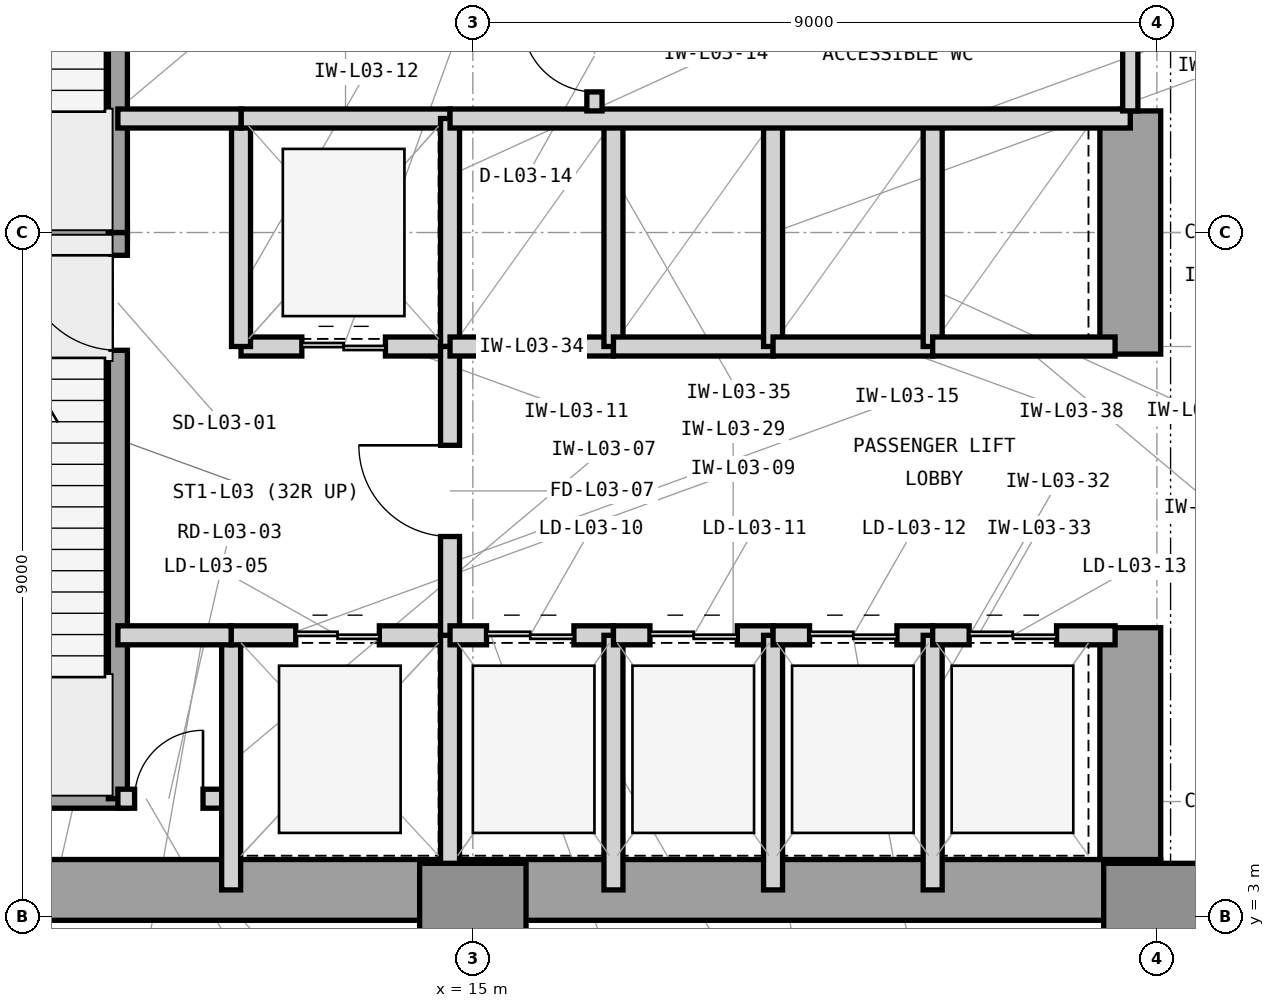
"""IFC4 building model, lengths in metres.
Left out: names, types, materials, properties, quantities, classifications, styles, units other than length and angle.
Written with IfcOpenShell. Run it as: python <this file> out.ifc"""

import sys

from ifc_helpers import new_model, si_unit, direction, frame, frame_2d, origin, origin_2d, place, context, subcontext, project, spatial, rectangle, extrude, element, fill, save


model = new_model("IFC4")
c1 = context("Model", 3, precision=1e-05, world=origin(), true_north=direction((0.0, 1.0)))
c2 = subcontext(c1, "Body", "Model", "MODEL_VIEW")
j1 = project(units=[si_unit("LENGTHUNIT", "METRE"), si_unit("PLANEANGLEUNIT", "RADIAN")], contexts=[c1])
p1 = place(None, origin())
s1 = spatial("IfcSite", under=j1, at=p1, CompositionType="ELEMENT")
p2 = place(p1, origin())
s2 = spatial("IfcBuilding", under=s1, at=p2, CompositionType="ELEMENT")
p3 = place(p2, frame((0.0, 0.0, 16.2)))
s3 = spatial("IfcBuildingStorey", under=s2, at=p3, CompositionType="ELEMENT", Elevation=16.2)
p4 = place(p3, frame((7.475, 3.35, 0.0), z_axis=(0.0, 0.0, 1.0), x_axis=(1.0, 0.0, 0.0)))
e1 = element("IfcWall", 1, at=p4, inside=s3, PredefinedType="SHEAR", context=c2, shape_type="SweptSolid", body=[
    extrude(rectangle(XDim=16.575, YDim=0.8, at=frame_2d((8.288, 0.0))), origin(), (0.0, 0.0, 1.0), 5.4),
])
p5 = place(p3, frame((23.65, 3.75, 0.0), z_axis=(0.0, 0.0, 1.0), x_axis=(0.0, 1.0, 0.0)))
e2 = element("IfcWall", 2, at=p5, inside=s3, PredefinedType="SHEAR", context=c2, shape_type="SweptSolid", body=[
    extrude(rectangle(XDim=3.05, YDim=0.8, at=frame_2d((1.525, 0.0))), origin(), (0.0, 0.0, 1.0), 5.4),
])
p6 = place(p3, frame((23.65, 10.4, 0.0), z_axis=(0.0, 0.0, 1.0), x_axis=(0.0, 1.0, 0.0)))
e3 = element("IfcWall", 3, at=p6, inside=s3, PredefinedType="SHEAR", context=c2, shape_type="SweptSolid", body=[
    extrude(rectangle(XDim=3.2, YDim=0.8, at=frame_2d((1.6, 0.0))), origin(), (0.0, 0.0, 1.0), 5.4),
])
for number, where, z_axis, x_axis in (
    (4, (15.0, 3.0, -0.6), (0.0, 0.0, 1.0), (1.0, 0.0, 0.0)),
    (5, (24.0, 3.0, -0.6), (0.0, 0.0, 1.0), (1.0, 0.0, 0.0)),
):
    element("IfcColumn", number, at=place(p3, frame(where, z_axis=z_axis, x_axis=x_axis)), inside=s3, PredefinedType="COLUMN", context=c2, shape_type="SweptSolid", body=[
        extrude(rectangle(XDim=1.4, YDim=1.4, at=origin_2d()), origin(), (0.0, 0.0, 1.0), 6.0),
    ])
p7 = place(p3, frame((6.35, 12.0, 0.0), z_axis=(0.0, 0.0, 1.0), x_axis=(1.0, 0.0, 0.0)))
e6 = element("IfcWall", 6, at=p7, inside=s3, PredefinedType="SHEAR", context=c2, shape_type="SweptSolid", body=[
    extrude(rectangle(XDim=4.105, YDim=0.25, at=frame_2d((2.052, 0.0))), origin(), (0.0, 0.0, 1.0), 5.4),
])
p8 = place(p3, frame((7.7, 4.55, 0.0), z_axis=(0.0, 0.0, 1.0), x_axis=(1.0, 0.0, 0.0)))
e7 = element("IfcWall", 7, at=p8, inside=s3, PredefinedType="SHEAR", context=c2, shape_type="SweptSolid", body=[
    extrude(rectangle(XDim=2.755, YDim=0.25, at=frame_2d((1.377, 0.0))), origin(), (0.0, 0.0, 1.0), 5.4),
])
p9 = place(p3, frame((10.33, 4.55, 0.0), z_axis=(0.0, 0.0, 1.0), x_axis=(0.0, 1.0, 0.0)))
e8 = element("IfcWall", 8, at=p9, inside=s3, PredefinedType="SHEAR", context=c2, shape_type="SweptSolid", body=[
    extrude(rectangle(XDim=7.45, YDim=0.25, at=frame_2d((3.725, 0.0))), origin(), (0.0, 0.0, 1.0), 5.4),
])
p10 = place(p9, frame((5.9, 0.0, 0.0)))
e9 = element("IfcOpeningElement", 9, at=p10, cuts=e8, PredefinedType="OPENING", context=c2, shape_type="SweptSolid", body=[
    extrude(rectangle(XDim=1.25, YDim=2.2, at=frame_2d((0.625, 1.1))), frame((0.0, 0.135, 0.0), z_axis=(0.0, -1.0, 0.0), x_axis=(1.0, 0.0, 0.0)), (0.0, 0.0, 1.0), 0.27),
])
p11 = place(p3, frame((10.33, 12.0, 0.0), z_axis=(0.0, 0.0, 1.0), x_axis=(0.0, 1.0, 0.0)))
e10 = element("IfcWall", 10, at=p11, inside=s3, PredefinedType="SHEAR", context=c2, shape_type="SweptSolid", body=[
    extrude(rectangle(XDim=7.45, YDim=0.25, at=frame_2d((3.725, 0.0))), origin(), (0.0, 0.0, 1.0), 5.4),
])
p12 = place(p11, frame((5.85, 0.0, 0.0)))
e11 = element("IfcOpeningElement", 11, at=p12, cuts=e10, PredefinedType="OPENING", context=c2, shape_type="SweptSolid", body=[
    extrude(rectangle(XDim=1.25, YDim=2.2, at=frame_2d((0.625, 1.1))), frame((0.0, 0.135, 0.0), z_axis=(0.0, -1.0, 0.0), x_axis=(1.0, 0.0, 0.0)), (0.0, 0.0, 1.0), 0.27),
])
p13 = place(p3, frame((10.33, 4.55, 0.0), z_axis=(0.0, 0.0, 1.0), x_axis=(1.0, 0.0, 0.0)))
e12 = element("IfcWall", 12, at=p13, inside=s3, PredefinedType="PARTITIONING", context=c2, shape_type="SweptSolid", body=[
    extrude(rectangle(XDim=1.49, YDim=0.25, at=frame_2d((0.745, 0.0))), origin(), (0.0, 0.0, 1.0), 5.13),
])
p14 = place(p13, frame((0.22, 0.0, 0.0)))
e13 = element("IfcOpeningElement", 13, at=p14, cuts=e12, PredefinedType="OPENING", context=c2, shape_type="SweptSolid", body=[
    extrude(rectangle(XDim=0.9, YDim=2.1, at=frame_2d((0.45, 1.05))), frame((0.0, 0.135, 0.0), z_axis=(0.0, -1.0, 0.0), x_axis=(1.0, 0.0, 0.0)), (0.0, 0.0, 1.0), 0.27),
])
p15 = place(p3, frame((11.82, 3.35, 0.0), z_axis=(0.0, 0.0, 1.0), x_axis=(0.0, 1.0, 0.0)))
e14 = element("IfcWall", 14, at=p15, inside=s3, PredefinedType="PARTITIONING", context=c2, shape_type="SweptSolid", body=[
    extrude(rectangle(XDim=3.35, YDim=0.25, at=frame_2d((1.675, 0.0))), origin(), (0.0, 0.0, 1.0), 5.13),
])
p16 = place(p3, frame((11.82, 6.7, 0.0), z_axis=(0.0, 0.0, 1.0), x_axis=(1.0, 0.0, 0.0)))
e15 = element("IfcWall", 15, at=p16, inside=s3, PredefinedType="PARTITIONING", context=c2, shape_type="SweptSolid", body=[
    extrude(rectangle(XDim=2.88, YDim=0.25, at=frame_2d((1.44, 0.0))), origin(), (0.0, 0.0, 1.0), 4.626),
])
p17 = place(p16, frame((0.85, 0.0, 0.0)))
e16 = element("IfcOpeningElement", 16, at=p17, cuts=e15, PredefinedType="OPENING", context=c2, shape_type="SweptSolid", body=[
    extrude(rectangle(XDim=1.1, YDim=2.25, at=frame_2d((0.55, 1.125))), frame((0.0, 0.135, 0.0), z_axis=(0.0, -1.0, 0.0), x_axis=(1.0, 0.0, 0.0)), (0.0, 0.0, 1.0), 0.27),
])
p18 = place(p3, frame((14.7, 3.35, 0.0), z_axis=(0.0, 0.0, 1.0), x_axis=(0.0, 1.0, 0.0)))
e17 = element("IfcWall", 17, at=p18, inside=s3, PredefinedType="PARTITIONING", context=c2, shape_type="SweptSolid", body=[
    extrude(rectangle(XDim=3.35, YDim=0.25, at=frame_2d((1.675, 0.0))), origin(), (0.0, 0.0, 1.0), 5.13),
])
p19 = place(p3, frame((11.95, 10.5, 0.0), z_axis=(0.0, 0.0, 1.0), x_axis=(1.0, 0.0, 0.0)))
e18 = element("IfcWall", 18, at=p19, inside=s3, PredefinedType="PARTITIONING", context=c2, shape_type="SweptSolid", body=[
    extrude(rectangle(XDim=2.75, YDim=0.25, at=frame_2d((1.375, 0.0))), origin(), (0.0, 0.0, 1.0), 4.626),
])
p20 = place(p19, frame((0.8, 0.0, 0.0)))
e19 = element("IfcOpeningElement", 19, at=p20, cuts=e18, PredefinedType="OPENING", context=c2, shape_type="SweptSolid", body=[
    extrude(rectangle(XDim=1.1, YDim=2.25, at=frame_2d((0.55, 1.125))), frame((0.0, 0.135, 0.0), z_axis=(0.0, -1.0, 0.0), x_axis=(1.0, 0.0, 0.0)), (0.0, 0.0, 1.0), 0.27),
])
p21 = place(p3, frame((11.95, 10.5, 0.0), z_axis=(0.0, 0.0, 1.0), x_axis=(0.0, 1.0, 0.0)))
e20 = element("IfcWall", 20, at=p21, inside=s3, PredefinedType="PARTITIONING", context=c2, shape_type="SweptSolid", body=[
    extrude(rectangle(XDim=3.0, YDim=0.25, at=frame_2d((1.5, 0.0))), origin(), (0.0, 0.0, 1.0), 5.13),
])
p22 = place(p3, frame((11.95, 13.5, 0.0), z_axis=(0.0, 0.0, 1.0), x_axis=(1.0, 0.0, 0.0)))
e21 = element("IfcWall", 21, at=p22, inside=s3, PredefinedType="PARTITIONING", context=c2, shape_type="SweptSolid", body=[
    extrude(rectangle(XDim=2.75, YDim=0.25, at=frame_2d((1.375, 0.0))), origin(), (0.0, 0.0, 1.0), 4.626),
])
p23 = place(p3, frame((14.7, 10.5, 0.0), z_axis=(0.0, 0.0, 1.0), x_axis=(0.0, 1.0, 0.0)))
e22 = element("IfcWall", 22, at=p23, inside=s3, PredefinedType="PARTITIONING", context=c2, shape_type="SweptSolid", body=[
    extrude(rectangle(XDim=3.0, YDim=0.25, at=frame_2d((1.5, 0.0))), origin(), (0.0, 0.0, 1.0), 5.13),
])
p24 = place(p3, frame((14.7, 6.7, 0.0), z_axis=(0.0, 0.0, 1.0), x_axis=(0.0, 1.0, 0.0)))
e23 = element("IfcWall", 23, at=p24, inside=s3, PredefinedType="PARTITIONING", context=c2, shape_type="SweptSolid", body=[
    extrude(rectangle(XDim=3.8, YDim=0.25, at=frame_2d((1.9, 0.0))), origin(), (0.0, 0.0, 1.0), 5.13),
])
p25 = place(p24, frame((1.3, 0.0, 0.0)))
e24 = element("IfcOpeningElement", 24, at=p25, cuts=e23, PredefinedType="OPENING", context=c2, shape_type="SweptSolid", body=[
    extrude(rectangle(XDim=1.2, YDim=2.2, at=frame_2d((0.6, 1.1))), frame((0.0, 0.135, 0.0), z_axis=(0.0, -1.0, 0.0), x_axis=(1.0, 0.0, 0.0)), (0.0, 0.0, 1.0), 0.27),
])
p26 = place(p3, frame((10.33, 13.5, 0.0), z_axis=(0.0, 0.0, 1.0), x_axis=(1.0, 0.0, 0.0)))
e25 = element("IfcWall", 25, at=p26, inside=s3, PredefinedType="PARTITIONING", context=c2, shape_type="SweptSolid", body=[
    extrude(rectangle(XDim=1.62, YDim=0.25, at=frame_2d((0.81, 0.0))), origin(), (0.0, 0.0, 1.0), 4.626),
])
p27 = place(p3, frame((10.33, 6.7, 0.0), z_axis=(0.0, 0.0, 1.0), x_axis=(1.0, 0.0, 0.0)))
e26 = element("IfcWall", 26, at=p27, inside=s3, PredefinedType="PARTITIONING", context=c2, shape_type="SweptSolid", body=[
    extrude(rectangle(XDim=1.49, YDim=0.25, at=frame_2d((0.745, 0.0))), origin(), (0.0, 0.0, 1.0), 4.626),
])
p28 = place(p3, frame((14.7, 6.7, 0.0), z_axis=(0.0, 0.0, 1.0), x_axis=(1.0, 0.0, 0.0)))
e27 = element("IfcWall", 27, at=p28, inside=s3, PredefinedType="PARTITIONING", context=c2, shape_type="SweptSolid", body=[
    extrude(rectangle(XDim=2.15, YDim=0.25, at=frame_2d((1.075, 0.0))), origin(), (0.0, 0.0, 1.0), 4.626),
])
p29 = place(p28, frame((0.48, 0.0, 0.0)))
e28 = element("IfcOpeningElement", 28, at=p29, cuts=e27, PredefinedType="OPENING", context=c2, shape_type="SweptSolid", body=[
    extrude(rectangle(XDim=1.15, YDim=2.25, at=frame_2d((0.575, 1.125))), frame((0.0, 0.135, 0.0), z_axis=(0.0, -1.0, 0.0), x_axis=(1.0, 0.0, 0.0)), (0.0, 0.0, 1.0), 0.27),
])
p30 = place(p3, frame((16.85, 3.35, 0.0), z_axis=(0.0, 0.0, 1.0), x_axis=(0.0, 1.0, 0.0)))
e29 = element("IfcWall", 29, at=p30, inside=s3, PredefinedType="PARTITIONING", context=c2, shape_type="SweptSolid", body=[
    extrude(rectangle(XDim=3.35, YDim=0.25, at=frame_2d((1.675, 0.0))), origin(), (0.0, 0.0, 1.0), 5.13),
])
p31 = place(p3, frame((16.85, 6.7, 0.0), z_axis=(0.0, 0.0, 1.0), x_axis=(1.0, 0.0, 0.0)))
e30 = element("IfcWall", 30, at=p31, inside=s3, PredefinedType="PARTITIONING", context=c2, shape_type="SweptSolid", body=[
    extrude(rectangle(XDim=2.1, YDim=0.25, at=frame_2d((1.05, 0.0))), origin(), (0.0, 0.0, 1.0), 4.626),
])
p32 = place(p31, frame((0.48, 0.0, 0.0)))
e31 = element("IfcOpeningElement", 31, at=p32, cuts=e30, PredefinedType="OPENING", context=c2, shape_type="SweptSolid", body=[
    extrude(rectangle(XDim=1.15, YDim=2.25, at=frame_2d((0.575, 1.125))), frame((0.0, 0.135, 0.0), z_axis=(0.0, -1.0, 0.0), x_axis=(1.0, 0.0, 0.0)), (0.0, 0.0, 1.0), 0.27),
])
p33 = place(p3, frame((18.95, 3.35, 0.0), z_axis=(0.0, 0.0, 1.0), x_axis=(0.0, 1.0, 0.0)))
e32 = element("IfcWall", 32, at=p33, inside=s3, PredefinedType="PARTITIONING", context=c2, shape_type="SweptSolid", body=[
    extrude(rectangle(XDim=3.35, YDim=0.25, at=frame_2d((1.675, 0.0))), origin(), (0.0, 0.0, 1.0), 5.13),
])
p34 = place(p3, frame((18.95, 6.7, 0.0), z_axis=(0.0, 0.0, 1.0), x_axis=(1.0, 0.0, 0.0)))
e33 = element("IfcWall", 33, at=p34, inside=s3, PredefinedType="PARTITIONING", context=c2, shape_type="SweptSolid", body=[
    extrude(rectangle(XDim=2.1, YDim=0.25, at=frame_2d((1.05, 0.0))), origin(), (0.0, 0.0, 1.0), 4.626),
])
p35 = place(p34, frame((0.48, 0.0, 0.0)))
e34 = element("IfcOpeningElement", 34, at=p35, cuts=e33, PredefinedType="OPENING", context=c2, shape_type="SweptSolid", body=[
    extrude(rectangle(XDim=1.15, YDim=2.25, at=frame_2d((0.575, 1.125))), frame((0.0, 0.135, 0.0), z_axis=(0.0, -1.0, 0.0), x_axis=(1.0, 0.0, 0.0)), (0.0, 0.0, 1.0), 0.27),
])
p36 = place(p3, frame((21.05, 3.35, 0.0), z_axis=(0.0, 0.0, 1.0), x_axis=(0.0, 1.0, 0.0)))
e35 = element("IfcWall", 35, at=p36, inside=s3, PredefinedType="PARTITIONING", context=c2, shape_type="SweptSolid", body=[
    extrude(rectangle(XDim=3.35, YDim=0.25, at=frame_2d((1.675, 0.0))), origin(), (0.0, 0.0, 1.0), 5.13),
])
p37 = place(p3, frame((21.05, 6.7, 0.0), z_axis=(0.0, 0.0, 1.0), x_axis=(1.0, 0.0, 0.0)))
e36 = element("IfcWall", 36, at=p37, inside=s3, PredefinedType="PARTITIONING", context=c2, shape_type="SweptSolid", body=[
    extrude(rectangle(XDim=2.4, YDim=0.25, at=frame_2d((1.2, 0.0))), origin(), (0.0, 0.0, 1.0), 4.626),
])
p38 = place(p37, frame((0.48, 0.0, 0.0)))
e37 = element("IfcOpeningElement", 37, at=p38, cuts=e36, PredefinedType="OPENING", context=c2, shape_type="SweptSolid", body=[
    extrude(rectangle(XDim=1.15, YDim=2.25, at=frame_2d((0.575, 1.125))), frame((0.0, 0.135, 0.0), z_axis=(0.0, -1.0, 0.0), x_axis=(1.0, 0.0, 0.0)), (0.0, 0.0, 1.0), 0.27),
])
p39 = place(p3, frame((14.7, 10.5, 0.0), z_axis=(0.0, 0.0, 1.0), x_axis=(1.0, 0.0, 0.0)))
e38 = element("IfcWall", 38, at=p39, inside=s3, PredefinedType="PARTITIONING", context=c2, shape_type="SweptSolid", body=[
    extrude(rectangle(XDim=2.15, YDim=0.25, at=frame_2d((1.075, 0.0))), origin(), (0.0, 0.0, 1.0), 4.626),
])
p40 = place(p3, frame((16.85, 10.5, 0.0), z_axis=(0.0, 0.0, 1.0), x_axis=(0.0, 1.0, 0.0)))
e39 = element("IfcWall", 39, at=p40, inside=s3, PredefinedType="PARTITIONING", context=c2, shape_type="SweptSolid", body=[
    extrude(rectangle(XDim=3.0, YDim=0.25, at=frame_2d((1.5, 0.0))), origin(), (0.0, 0.0, 1.0), 5.13),
])
p41 = place(p3, frame((16.85, 10.5, 0.0), z_axis=(0.0, 0.0, 1.0), x_axis=(1.0, 0.0, 0.0)))
e40 = element("IfcWall", 40, at=p41, inside=s3, PredefinedType="PARTITIONING", context=c2, shape_type="SweptSolid", body=[
    extrude(rectangle(XDim=2.1, YDim=0.25, at=frame_2d((1.05, 0.0))), origin(), (0.0, 0.0, 1.0), 4.626),
])
p42 = place(p3, frame((18.95, 10.5, 0.0), z_axis=(0.0, 0.0, 1.0), x_axis=(0.0, 1.0, 0.0)))
e41 = element("IfcWall", 41, at=p42, inside=s3, PredefinedType="PARTITIONING", context=c2, shape_type="SweptSolid", body=[
    extrude(rectangle(XDim=3.0, YDim=0.25, at=frame_2d((1.5, 0.0))), origin(), (0.0, 0.0, 1.0), 5.13),
])
p43 = place(p3, frame((18.95, 10.5, 0.0), z_axis=(0.0, 0.0, 1.0), x_axis=(1.0, 0.0, 0.0)))
e42 = element("IfcWall", 42, at=p43, inside=s3, PredefinedType="PARTITIONING", context=c2, shape_type="SweptSolid", body=[
    extrude(rectangle(XDim=2.1, YDim=0.25, at=frame_2d((1.05, 0.0))), origin(), (0.0, 0.0, 1.0), 4.626),
])
p44 = place(p3, frame((21.05, 10.5, 0.0), z_axis=(0.0, 0.0, 1.0), x_axis=(0.0, 1.0, 0.0)))
e43 = element("IfcWall", 43, at=p44, inside=s3, PredefinedType="PARTITIONING", context=c2, shape_type="SweptSolid", body=[
    extrude(rectangle(XDim=3.0, YDim=0.25, at=frame_2d((1.5, 0.0))), origin(), (0.0, 0.0, 1.0), 5.13),
])
p45 = place(p3, frame((21.05, 10.5, 0.0), z_axis=(0.0, 0.0, 1.0), x_axis=(1.0, 0.0, 0.0)))
e44 = element("IfcWall", 44, at=p45, inside=s3, PredefinedType="PARTITIONING", context=c2, shape_type="SweptSolid", body=[
    extrude(rectangle(XDim=2.4, YDim=0.25, at=frame_2d((1.2, 0.0))), origin(), (0.0, 0.0, 1.0), 4.626),
])
p46 = place(p3, frame((14.7, 13.5, 0.0), z_axis=(0.0, 0.0, 1.0), x_axis=(1.0, 0.0, 0.0)))
e45 = element("IfcWall", 45, at=p46, inside=s3, PredefinedType="PARTITIONING", context=c2, shape_type="SweptSolid", body=[
    extrude(rectangle(XDim=8.95, YDim=0.25, at=frame_2d((4.475, 0.0))), origin(), (0.0, 0.0, 1.0), 4.626),
])
p47 = place(p3, frame((16.6, 13.6, 0.0), z_axis=(0.0, 0.0, 1.0), x_axis=(0.0, 1.0, 0.0)))
e46 = element("IfcWall", 46, at=p47, inside=s3, PredefinedType="PARTITIONING", context=c2, shape_type="SweptSolid", body=[
    extrude(rectangle(XDim=3.0, YDim=0.2, at=frame_2d((1.5, 0.0))), origin(), (0.0, 0.0, 1.0), 5.13),
])
p48 = place(p47, frame((0.25, 0.0, 0.0)))
e47 = element("IfcOpeningElement", 47, at=p48, cuts=e46, PredefinedType="OPENING", context=c2, shape_type="SweptSolid", body=[
    extrude(rectangle(XDim=0.95, YDim=2.1, at=frame_2d((0.475, 1.05))), frame((0.0, 0.11, 0.0), z_axis=(0.0, -1.0, 0.0), x_axis=(1.0, 0.0, 0.0)), (0.0, 0.0, 1.0), 0.22),
])
p49 = place(p47, frame((1.8, 0.0, 0.0)))
e48 = element("IfcOpeningElement", 48, at=p49, cuts=e46, PredefinedType="OPENING", context=c2, shape_type="SweptSolid", body=[
    extrude(rectangle(XDim=0.95, YDim=2.1, at=frame_2d((0.475, 1.05))), frame((0.0, 0.11, 0.0), z_axis=(0.0, -1.0, 0.0), x_axis=(1.0, 0.0, 0.0)), (0.0, 0.0, 1.0), 0.22),
])
p50 = place(p3, frame((23.65, 13.6, 0.0), z_axis=(0.0, 0.0, 1.0), x_axis=(0.0, 1.0, 0.0)))
e49 = element("IfcWall", 49, at=p50, inside=s3, PredefinedType="PARTITIONING", context=c2, shape_type="SweptSolid", body=[
    extrude(rectangle(XDim=3.0, YDim=0.2, at=frame_2d((1.5, 0.0))), origin(), (0.0, 0.0, 1.0), 5.13),
])
p51 = place(p10, origin())
e50 = element("IfcDoor", 50, at=p51, inside=s3, OperationType="SINGLE_SWING_RIGHT", PredefinedType="DOOR", context=c2, shape_type="SweptSolid", body=[
    extrude(rectangle(XDim=1.25, YDim=2.2, at=frame_2d((0.625, 1.1))), frame((0.0, 0.025, 0.0), z_axis=(0.0, -1.0, 0.0), x_axis=(1.0, 0.0, 0.0)), (0.0, 0.0, 1.0), 0.05),
])
fill(e9, e50)
p52 = place(p14, origin())
e51 = element("IfcDoor", 51, at=p52, inside=s3, OperationType="SINGLE_SWING_RIGHT", PredefinedType="TRAPDOOR", context=c2, shape_type="SweptSolid", body=[
    extrude(rectangle(XDim=0.9, YDim=2.1, at=frame_2d((0.45, 1.05))), frame((0.0, 0.025, 0.0), z_axis=(0.0, -1.0, 0.0), x_axis=(1.0, 0.0, 0.0)), (0.0, 0.0, 1.0), 0.05),
])
fill(e13, e51)
p53 = place(p17, origin())
e52 = element("IfcDoor", 52, at=p53, inside=s3, OperationType="DOUBLE_DOOR_SLIDING", PredefinedType="DOOR", context=c2, shape_type="SweptSolid", body=[
    extrude(rectangle(XDim=1.1, YDim=2.25, at=frame_2d((0.55, 1.125))), frame((0.0, 0.025, 0.0), z_axis=(0.0, -1.0, 0.0), x_axis=(1.0, 0.0, 0.0)), (0.0, 0.0, 1.0), 0.05),
])
fill(e16, e52)
p54 = place(p20, origin())
e53 = element("IfcDoor", 53, at=p54, inside=s3, OperationType="DOUBLE_DOOR_SLIDING", PredefinedType="DOOR", context=c2, shape_type="SweptSolid", body=[
    extrude(rectangle(XDim=1.1, YDim=2.25, at=frame_2d((0.55, 1.125))), frame((0.0, 0.025, 0.0), z_axis=(0.0, -1.0, 0.0), x_axis=(1.0, 0.0, 0.0)), (0.0, 0.0, 1.0), 0.05),
])
fill(e19, e53)
p55 = place(p25, origin())
e54 = element("IfcDoor", 54, at=p55, inside=s3, OperationType="SINGLE_SWING_RIGHT", PredefinedType="DOOR", context=c2, shape_type="SweptSolid", body=[
    extrude(rectangle(XDim=1.2, YDim=2.2, at=frame_2d((0.6, 1.1))), frame((0.0, 0.025, 0.0), z_axis=(0.0, -1.0, 0.0), x_axis=(1.0, 0.0, 0.0)), (0.0, 0.0, 1.0), 0.05),
])
fill(e24, e54)
p56 = place(p29, origin())
e55 = element("IfcDoor", 55, at=p56, inside=s3, OperationType="DOUBLE_DOOR_SLIDING", PredefinedType="DOOR", context=c2, shape_type="SweptSolid", body=[
    extrude(rectangle(XDim=1.15, YDim=2.25, at=frame_2d((0.575, 1.125))), frame((0.0, 0.025, 0.0), z_axis=(0.0, -1.0, 0.0), x_axis=(1.0, 0.0, 0.0)), (0.0, 0.0, 1.0), 0.05),
])
fill(e28, e55)
p57 = place(p32, origin())
e56 = element("IfcDoor", 56, at=p57, inside=s3, OperationType="DOUBLE_DOOR_SLIDING", PredefinedType="DOOR", context=c2, shape_type="SweptSolid", body=[
    extrude(rectangle(XDim=1.15, YDim=2.25, at=frame_2d((0.575, 1.125))), frame((0.0, 0.025, 0.0), z_axis=(0.0, -1.0, 0.0), x_axis=(1.0, 0.0, 0.0)), (0.0, 0.0, 1.0), 0.05),
])
fill(e31, e56)
p58 = place(p35, origin())
e57 = element("IfcDoor", 57, at=p58, inside=s3, OperationType="DOUBLE_DOOR_SLIDING", PredefinedType="DOOR", context=c2, shape_type="SweptSolid", body=[
    extrude(rectangle(XDim=1.15, YDim=2.25, at=frame_2d((0.575, 1.125))), frame((0.0, 0.025, 0.0), z_axis=(0.0, -1.0, 0.0), x_axis=(1.0, 0.0, 0.0)), (0.0, 0.0, 1.0), 0.05),
])
fill(e34, e57)
p59 = place(p38, origin())
e58 = element("IfcDoor", 58, at=p59, inside=s3, OperationType="DOUBLE_DOOR_SLIDING", PredefinedType="DOOR", context=c2, shape_type="SweptSolid", body=[
    extrude(rectangle(XDim=1.15, YDim=2.25, at=frame_2d((0.575, 1.125))), frame((0.0, 0.025, 0.0), z_axis=(0.0, -1.0, 0.0), x_axis=(1.0, 0.0, 0.0)), (0.0, 0.0, 1.0), 0.05),
])
fill(e37, e58)
p60 = place(p48, origin())
e59 = element("IfcDoor", 59, at=p60, inside=s3, OperationType="SINGLE_SWING_RIGHT", PredefinedType="DOOR", context=c2, shape_type="SweptSolid", body=[
    extrude(rectangle(XDim=0.95, YDim=2.1, at=frame_2d((0.475, 1.05))), frame((0.0, 0.025, 0.0), z_axis=(0.0, -1.0, 0.0), x_axis=(1.0, 0.0, 0.0)), (0.0, 0.0, 1.0), 0.05),
])
fill(e47, e59)
save(model, sys.argv[1])
